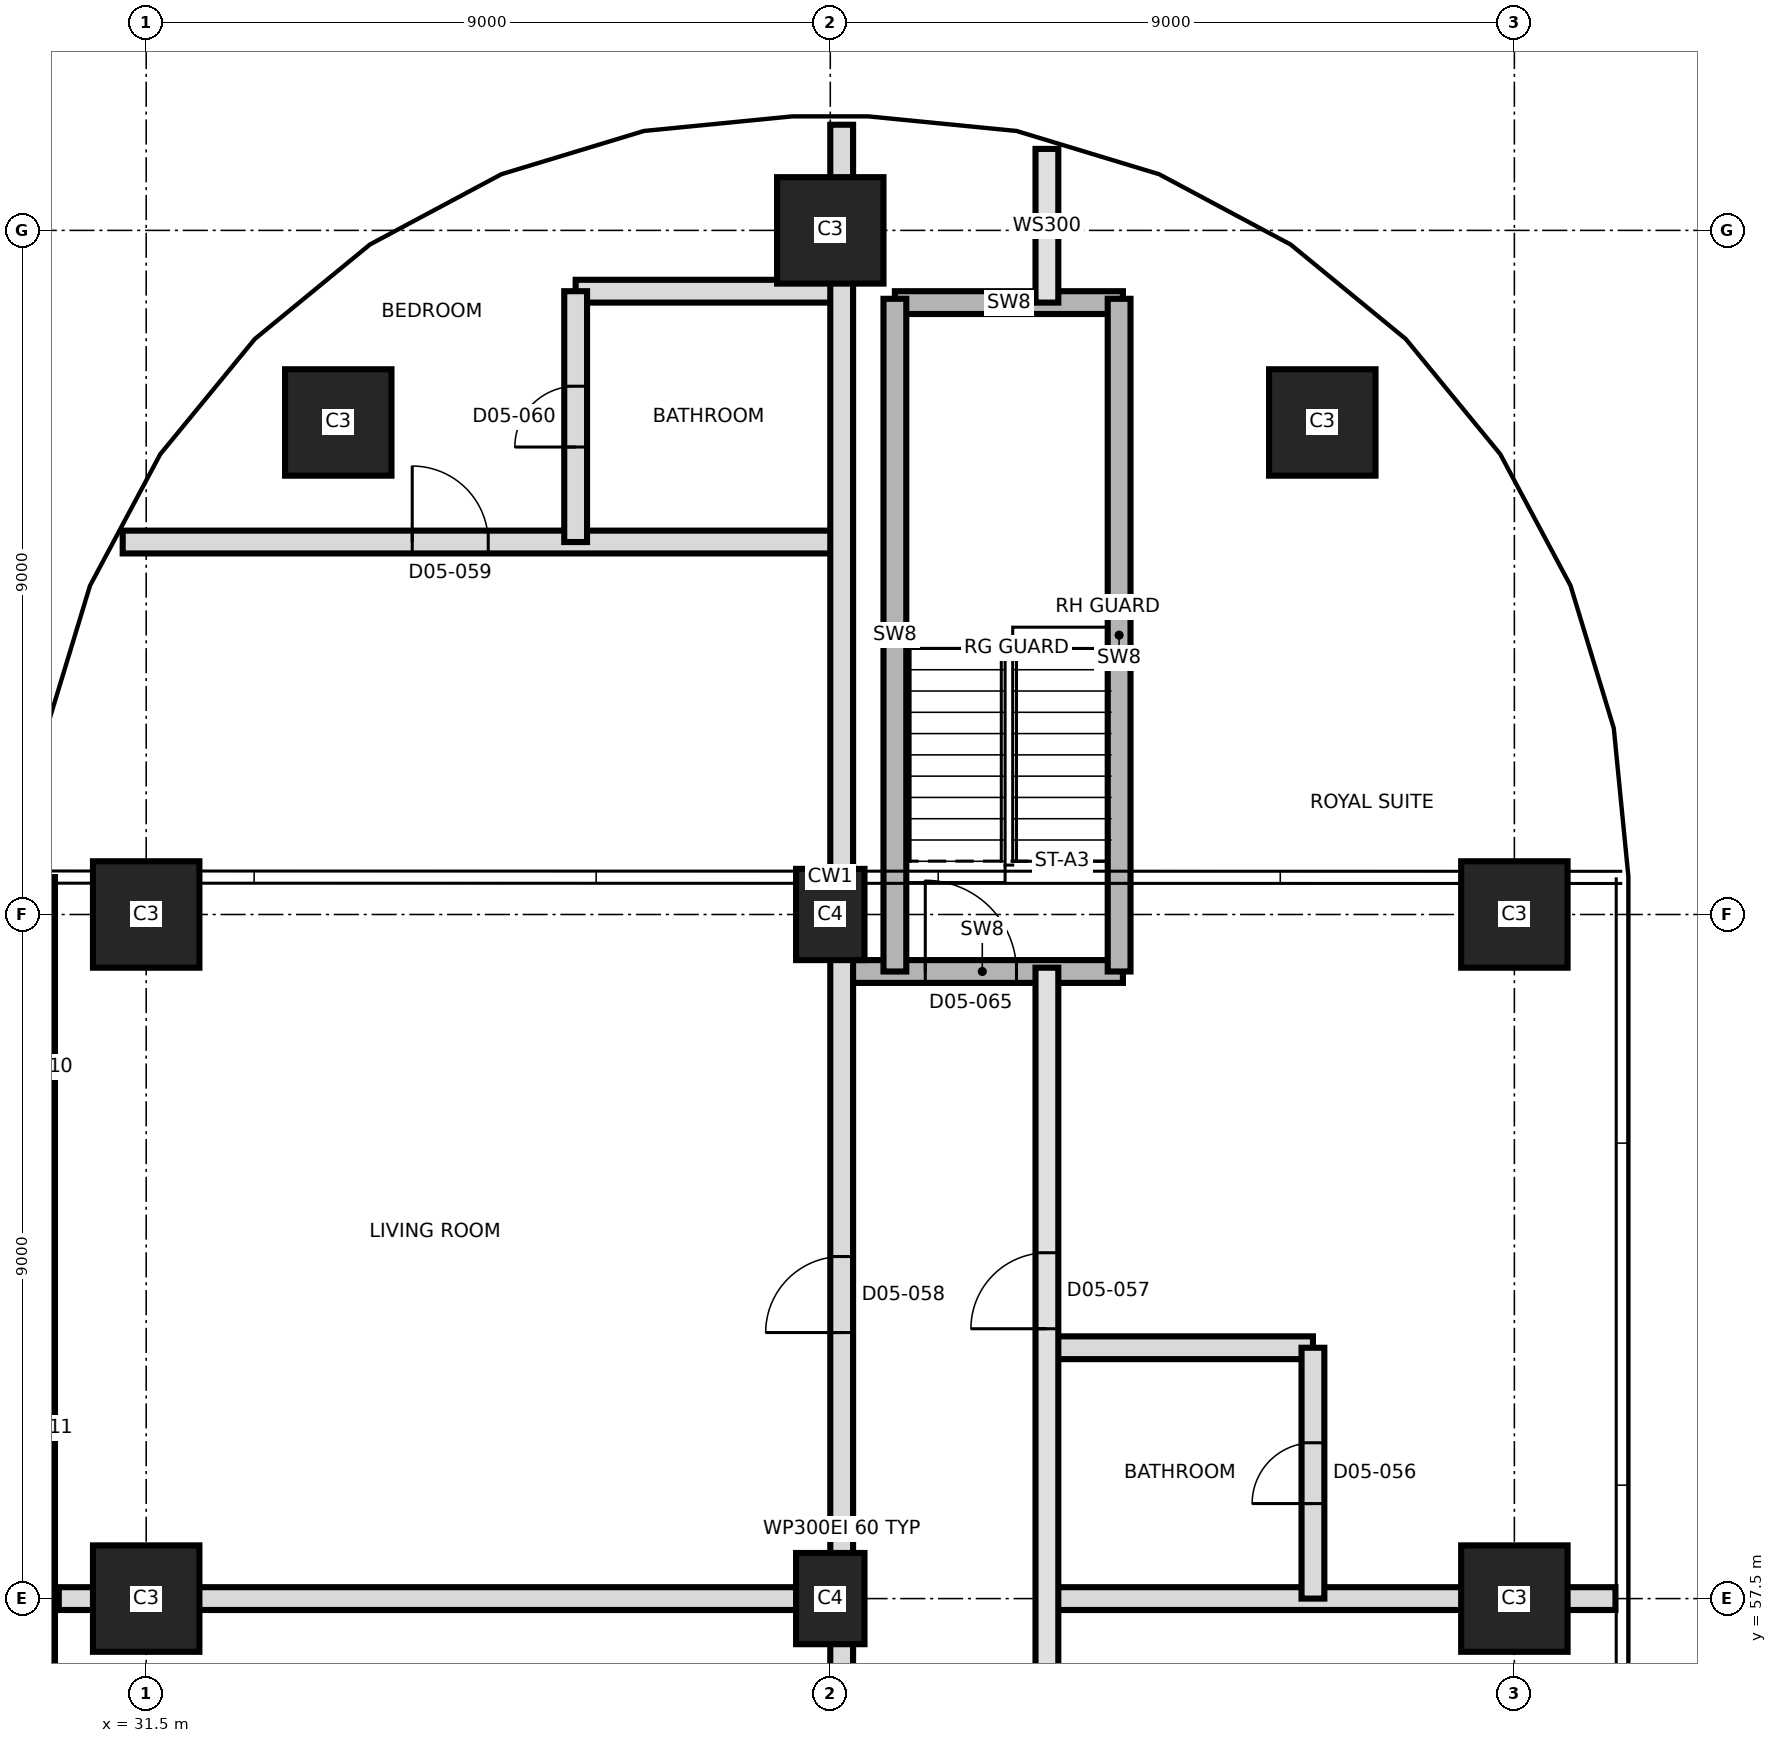
"""IFC4 building model, lengths in metres.
Left out: names, types, materials, properties, quantities, classifications, styles, units other than length and angle.
Written with IfcOpenShell. Run it as: python <this file> out.ifc"""

import sys

from ifc_helpers import new_model, si_unit, direction, frame, frame_2d, origin, origin_2d, place, context, subcontext, project, spatial, rectangle, extrude, element, fill, save


model = new_model("IFC4")
c1 = context("Model", 3, precision=1e-05, world=origin(), true_north=direction((0.0, 1.0)))
c2 = subcontext(c1, "Body", "Model", "MODEL_VIEW")
j1 = project(units=[si_unit("LENGTHUNIT", "METRE"), si_unit("PLANEANGLEUNIT", "RADIAN")], contexts=[c1])
p1 = place(None, origin())
s1 = spatial("IfcSite", under=j1, at=p1, CompositionType="ELEMENT")
p2 = place(p1, origin())
s2 = spatial("IfcBuilding", under=s1, at=p2, CompositionType="ELEMENT")
p3 = place(p2, frame((0.0, 0.0, 70.5)))
s3 = spatial("IfcBuildingStorey", under=s2, at=p3, CompositionType="ELEMENT", Elevation=70.5)
p4 = place(p3, frame((31.5, 57.5, 0.0), z_axis=(0.0, 0.0, 1.0), x_axis=(1.0, 0.0, 0.0)))
e1 = element("IfcColumn", 1, at=p4, inside=s3, PredefinedType="COLUMN", context=c2, shape_type="SweptSolid", body=[
    extrude(rectangle(XDim=1.4, YDim=1.4, at=origin_2d()), origin(), (0.0, 0.0, 1.0), 3.7),
])
p5 = place(p3, frame((40.5, 57.5, 0.0), z_axis=(0.0, 0.0, 1.0), x_axis=(0.0, 1.0, 0.0)))
e2 = element("IfcColumn", 2, at=p5, inside=s3, PredefinedType="COLUMN", context=c2, shape_type="SweptSolid", body=[
    extrude(rectangle(XDim=1.2, YDim=0.9, at=origin_2d()), origin(), (0.0, 0.0, 1.0), 3.7),
])
for number, where, z_axis, x_axis in (
    (3, (49.5, 57.5, 0.0), (0.0, 0.0, 1.0), (1.0, 0.0, 0.0)),
    (4, (31.5, 66.5, 0.0), (0.0, 0.0, 1.0), (1.0, 0.0, 0.0)),
):
    element("IfcColumn", number, at=place(p3, frame(where, z_axis=z_axis, x_axis=x_axis)), inside=s3, PredefinedType="COLUMN", context=c2, shape_type="SweptSolid", body=[
        extrude(rectangle(XDim=1.4, YDim=1.4, at=origin_2d()), origin(), (0.0, 0.0, 1.0), 3.7),
    ])
p6 = place(p3, frame((40.5, 66.5, 0.0), z_axis=(0.0, 0.0, 1.0), x_axis=(0.0, 1.0, 0.0)))
e5 = element("IfcColumn", 5, at=p6, inside=s3, PredefinedType="COLUMN", context=c2, shape_type="SweptSolid", body=[
    extrude(rectangle(XDim=1.2, YDim=0.9, at=origin_2d()), origin(), (0.0, 0.0, 1.0), 3.7),
])
for number, where, z_axis, x_axis in (
    (6, (49.5, 66.5, 0.0), (0.0, 0.0, 1.0), (1.0, 0.0, 0.0)),
    (7, (34.027, 72.973, 0.0), (0.0, 0.0, 1.0), (1.0, 0.0, 0.0)),
    (8, (46.973, 72.973, 0.0), (0.0, 0.0, 1.0), (1.0, 0.0, 0.0)),
    (9, (40.5, 75.5, 0.0), (0.0, 0.0, 1.0), (1.0, 0.0, 0.0)),
):
    element("IfcColumn", number, at=place(p3, frame(where, z_axis=z_axis, x_axis=x_axis)), inside=s3, PredefinedType="COLUMN", context=c2, shape_type="SweptSolid", body=[
        extrude(rectangle(XDim=1.4, YDim=1.4, at=origin_2d()), origin(), (0.0, 0.0, 1.0), 3.7),
    ])
p7 = place(p3, frame((30.15, 66.992, 0.0), z_axis=(0.0, 0.0, 1.0), x_axis=(0.0, -1.0, 0.0)))
e10 = element("IfcWall", 10, at=p7, inside=s3, PredefinedType="SOLIDWALL", context=c2, shape_type="SweptSolid", body=[
    extrude(rectangle(XDim=32.968, YDim=0.3, at=frame_2d((16.484, 0.0))), origin(), (0.0, 0.0, 1.0), 3.4),
])
p8 = place(p7, frame((1.596, 0.0, 0.3)))
e11 = element("IfcOpeningElement", 11, at=p8, cuts=e10, PredefinedType="OPENING", context=c2, shape_type="SweptSolid", body=[
    extrude(rectangle(XDim=1.8, YDim=2.4, at=frame_2d((0.9, 1.2))), frame((0.0, 0.16, 0.0), z_axis=(0.0, -1.0, 0.0), x_axis=(1.0, 0.0, 0.0)), (0.0, 0.0, 1.0), 0.32),
])
p9 = place(p7, frame((5.142, 0.0, 0.9)))
e12 = element("IfcOpeningElement", 12, at=p9, cuts=e10, PredefinedType="OPENING", context=c2, shape_type="SweptSolid", body=[
    extrude(rectangle(XDim=4.2, YDim=1.5, at=frame_2d((2.1, 0.75))), frame((0.0, 0.16, 0.0), z_axis=(0.0, -1.0, 0.0), x_axis=(1.0, 0.0, 0.0)), (0.0, 0.0, 1.0), 0.32),
])
p10 = place(p7, frame((9.642, 0.0, 0.9)))
e13 = element("IfcOpeningElement", 13, at=p10, cuts=e10, PredefinedType="OPENING", context=c2, shape_type="SweptSolid", body=[
    extrude(rectangle(XDim=4.2, YDim=1.5, at=frame_2d((2.1, 0.75))), frame((0.0, 0.16, 0.0), z_axis=(0.0, -1.0, 0.0), x_axis=(1.0, 0.0, 0.0)), (0.0, 0.0, 1.0), 0.32),
])
p11 = place(p7, frame((14.142, 0.0, 0.9)))
e14 = element("IfcOpeningElement", 14, at=p11, cuts=e10, PredefinedType="OPENING", context=c2, shape_type="SweptSolid", body=[
    extrude(rectangle(XDim=4.2, YDim=1.5, at=frame_2d((2.1, 0.75))), frame((0.0, 0.16, 0.0), z_axis=(0.0, -1.0, 0.0), x_axis=(1.0, 0.0, 0.0)), (0.0, 0.0, 1.0), 0.32),
])
p12 = place(p7, frame((18.642, 0.0, 0.9)))
e15 = element("IfcOpeningElement", 15, at=p12, cuts=e10, PredefinedType="OPENING", context=c2, shape_type="SweptSolid", body=[
    extrude(rectangle(XDim=4.2, YDim=1.5, at=frame_2d((2.1, 0.75))), frame((0.0, 0.16, 0.0), z_axis=(0.0, -1.0, 0.0), x_axis=(1.0, 0.0, 0.0)), (0.0, 0.0, 1.0), 0.32),
])
p13 = place(p7, frame((23.142, 0.0, 0.9)))
e16 = element("IfcOpeningElement", 16, at=p13, cuts=e10, PredefinedType="OPENING", context=c2, shape_type="SweptSolid", body=[
    extrude(rectangle(XDim=4.2, YDim=1.5, at=frame_2d((2.1, 0.75))), frame((0.0, 0.16, 0.0), z_axis=(0.0, -1.0, 0.0), x_axis=(1.0, 0.0, 0.0)), (0.0, 0.0, 1.0), 0.32),
])
p14 = place(p7, frame((29.33, 0.0, 0.3)))
e17 = element("IfcOpeningElement", 17, at=p14, cuts=e10, PredefinedType="OPENING", context=c2, shape_type="SweptSolid", body=[
    extrude(rectangle(XDim=1.8, YDim=2.4, at=frame_2d((0.9, 1.2))), frame((0.0, 0.16, 0.0), z_axis=(0.0, -1.0, 0.0), x_axis=(1.0, 0.0, 0.0)), (0.0, 0.0, 1.0), 0.32),
])
p15 = place(p3, frame((30.35, 57.5, 0.0), z_axis=(0.0, 0.0, 1.0), x_axis=(1.0, 0.0, 0.0)))
e18 = element("IfcWall", 18, at=p15, inside=s3, PredefinedType="PARTITIONING", context=c2, shape_type="SweptSolid", body=[
    extrude(rectangle(XDim=10.3, YDim=0.3, at=frame_2d((5.15, 0.0))), origin(), (0.0, 0.0, 1.0), 3.4),
])
p16 = place(p3, frame((43.35, 57.5, 0.0), z_axis=(0.0, 0.0, 1.0), x_axis=(1.0, 0.0, 0.0)))
e19 = element("IfcWall", 19, at=p16, inside=s3, PredefinedType="PARTITIONING", context=c2, shape_type="SweptSolid", body=[
    extrude(rectangle(XDim=7.48, YDim=0.3, at=frame_2d((3.74, 0.0))), origin(), (0.0, 0.0, 1.0), 3.4),
])
p17 = place(p3, frame((43.35, 60.8, 0.0), z_axis=(0.0, 0.0, 1.0), x_axis=(1.0, 0.0, 0.0)))
e20 = element("IfcWall", 20, at=p17, inside=s3, PredefinedType="PARTITIONING", context=c2, shape_type="SweptSolid", body=[
    extrude(rectangle(XDim=3.5, YDim=0.3, at=frame_2d((1.75, 0.0))), origin(), (0.0, 0.0, 1.0), 3.4),
])
p18 = place(p3, frame((40.65, 65.75, 0.0), z_axis=(0.0, 0.0, 1.0), x_axis=(1.0, 0.0, 0.0)))
e21 = element("IfcWall", 21, at=p18, inside=s3, PredefinedType="SHEAR", context=c2, shape_type="SweptSolid", body=[
    extrude(rectangle(XDim=3.7, YDim=0.3, at=frame_2d((1.85, 0.0))), origin(), (0.0, 0.0, 1.0), 3.4),
])
p19 = place(p18, frame((1.1, 0.0, 0.0)))
e22 = element("IfcOpeningElement", 22, at=p19, cuts=e21, PredefinedType="OPENING", context=c2, shape_type="SweptSolid", body=[
    extrude(rectangle(XDim=1.2, YDim=2.1, at=frame_2d((0.6, 1.05))), frame((0.0, 0.16, 0.0), z_axis=(0.0, -1.0, 0.0), x_axis=(1.0, 0.0, 0.0)), (0.0, 0.0, 1.0), 0.32),
])
p20 = place(p3, frame((31.191, 71.4, 0.0), z_axis=(0.0, 0.0, 1.0), x_axis=(1.0, 0.0, 0.0)))
e23 = element("IfcWall", 23, at=p20, inside=s3, PredefinedType="PARTITIONING", context=c2, shape_type="SweptSolid", body=[
    extrude(rectangle(XDim=9.459, YDim=0.3, at=frame_2d((4.729, 0.0))), origin(), (0.0, 0.0, 1.0), 3.4),
])
p21 = place(p20, frame((3.809, 0.0, 0.0)))
e24 = element("IfcOpeningElement", 24, at=p21, cuts=e23, PredefinedType="OPENING", context=c2, shape_type="SweptSolid", body=[
    extrude(rectangle(XDim=1.0, YDim=2.1, at=frame_2d((0.5, 1.05))), frame((0.0, 0.16, 0.0), z_axis=(0.0, -1.0, 0.0), x_axis=(1.0, 0.0, 0.0)), (0.0, 0.0, 1.0), 0.32),
])
p22 = place(p3, frame((41.35, 74.55, 0.0), z_axis=(0.0, 0.0, 1.0), x_axis=(1.0, 0.0, 0.0)))
e25 = element("IfcWall", 25, at=p22, inside=s3, PredefinedType="SHEAR", context=c2, shape_type="SweptSolid", body=[
    extrude(rectangle(XDim=3.0, YDim=0.3, at=frame_2d((1.5, 0.0))), origin(), (0.0, 0.0, 1.0), 3.4),
])
p23 = place(p3, frame((37.15, 74.7, 0.0), z_axis=(0.0, 0.0, 1.0), x_axis=(1.0, 0.0, 0.0)))
e26 = element("IfcWall", 26, at=p23, inside=s3, PredefinedType="PARTITIONING", context=c2, shape_type="SweptSolid", body=[
    extrude(rectangle(XDim=3.5, YDim=0.3, at=frame_2d((1.75, 0.0))), origin(), (0.0, 0.0, 1.0), 3.4),
])
p24 = place(p3, frame((37.15, 71.4, 0.0), z_axis=(0.0, 0.0, 1.0), x_axis=(0.0, 1.0, 0.0)))
e27 = element("IfcWall", 27, at=p24, inside=s3, PredefinedType="PARTITIONING", context=c2, shape_type="SweptSolid", body=[
    extrude(rectangle(XDim=3.3, YDim=0.3, at=frame_2d((1.65, 0.0))), origin(), (0.0, 0.0, 1.0), 3.4),
])
p25 = place(p24, frame((1.25, 0.0, 0.0)))
e28 = element("IfcOpeningElement", 28, at=p25, cuts=e27, PredefinedType="OPENING", context=c2, shape_type="SweptSolid", body=[
    extrude(rectangle(XDim=0.8, YDim=2.1, at=frame_2d((0.4, 1.05))), frame((0.0, 0.16, 0.0), z_axis=(0.0, -1.0, 0.0), x_axis=(1.0, 0.0, 0.0)), (0.0, 0.0, 1.0), 0.32),
])
p26 = place(p3, frame((40.65, 39.95, 0.0), z_axis=(0.0, 0.0, 1.0), x_axis=(0.0, 1.0, 0.0)))
e29 = element("IfcWall", 29, at=p26, inside=s3, PredefinedType="PARTITIONING", context=c2, shape_type="SweptSolid", body=[
    extrude(rectangle(XDim=36.94, YDim=0.3, at=frame_2d((18.47, 0.0))), origin(), (0.0, 0.0, 1.0), 3.4),
])
p27 = place(p26, frame((0.7, 0.0, 0.0)))
e30 = element("IfcOpeningElement", 30, at=p27, cuts=e29, PredefinedType="OPENING", context=c2, shape_type="SweptSolid", body=[
    extrude(rectangle(XDim=1.0, YDim=2.1, at=frame_2d((0.5, 1.05))), frame((0.0, 0.16, 0.0), z_axis=(0.0, -1.0, 0.0), x_axis=(1.0, 0.0, 0.0)), (0.0, 0.0, 1.0), 0.32),
])
p28 = place(p26, frame((6.55, 0.0, 0.0)))
e31 = element("IfcOpeningElement", 31, at=p28, cuts=e29, PredefinedType="OPENING", context=c2, shape_type="SweptSolid", body=[
    extrude(rectangle(XDim=1.0, YDim=2.1, at=frame_2d((0.5, 1.05))), frame((0.0, 0.16, 0.0), z_axis=(0.0, -1.0, 0.0), x_axis=(1.0, 0.0, 0.0)), (0.0, 0.0, 1.0), 0.32),
])
p29 = place(p26, frame((9.22, 0.0, 0.0)))
e32 = element("IfcOpeningElement", 32, at=p29, cuts=e29, PredefinedType="OPENING", context=c2, shape_type="SweptSolid", body=[
    extrude(rectangle(XDim=1.0, YDim=2.1, at=frame_2d((0.5, 1.05))), frame((0.0, 0.16, 0.0), z_axis=(0.0, -1.0, 0.0), x_axis=(1.0, 0.0, 0.0)), (0.0, 0.0, 1.0), 0.32),
])
p30 = place(p26, frame((15.07, 0.0, 0.0)))
e33 = element("IfcOpeningElement", 33, at=p30, cuts=e29, PredefinedType="OPENING", context=c2, shape_type="SweptSolid", body=[
    extrude(rectangle(XDim=1.0, YDim=2.1, at=frame_2d((0.5, 1.05))), frame((0.0, 0.16, 0.0), z_axis=(0.0, -1.0, 0.0), x_axis=(1.0, 0.0, 0.0)), (0.0, 0.0, 1.0), 0.32),
])
p31 = place(p26, frame((21.05, 0.0, 0.0)))
e34 = element("IfcOpeningElement", 34, at=p31, cuts=e29, PredefinedType="OPENING", context=c2, shape_type="SweptSolid", body=[
    extrude(rectangle(XDim=1.0, YDim=2.4, at=frame_2d((0.5, 1.2))), frame((0.0, 0.16, 0.0), z_axis=(0.0, -1.0, 0.0), x_axis=(1.0, 0.0, 0.0)), (0.0, 0.0, 1.0), 0.32),
])
p32 = place(p3, frame((41.35, 65.75, 0.0), z_axis=(0.0, 0.0, 1.0), x_axis=(0.0, 1.0, 0.0)))
e35 = element("IfcWall", 35, at=p32, inside=s3, PredefinedType="SHEAR", context=c2, shape_type="SweptSolid", body=[
    extrude(rectangle(XDim=8.85, YDim=0.3, at=frame_2d((4.425, 0.0))), origin(), (0.0, 0.0, 1.0), 3.4),
])
p33 = place(p3, frame((43.35, 39.95, 0.0), z_axis=(0.0, 0.0, 1.0), x_axis=(0.0, 1.0, 0.0)))
e36 = element("IfcWall", 36, at=p33, inside=s3, PredefinedType="SOLIDWALL", context=c2, shape_type="SweptSolid", body=[
    extrude(rectangle(XDim=25.85, YDim=0.3, at=frame_2d((12.925, 0.0))), origin(), (0.0, 0.0, 1.0), 3.4),
])
p34 = place(p33, frame((3.55, 0.0, 0.0)))
e37 = element("IfcOpeningElement", 37, at=p34, cuts=e36, PredefinedType="OPENING", context=c2, shape_type="SweptSolid", body=[
    extrude(rectangle(XDim=1.0, YDim=2.4, at=frame_2d((0.5, 1.2))), frame((0.0, 0.16, 0.0), z_axis=(0.0, -1.0, 0.0), x_axis=(1.0, 0.0, 0.0)), (0.0, 0.0, 1.0), 0.32),
])
p35 = place(p33, frame((9.7, 0.0, 0.0)))
e38 = element("IfcOpeningElement", 38, at=p35, cuts=e36, PredefinedType="OPENING", context=c2, shape_type="SweptSolid", body=[
    extrude(rectangle(XDim=1.0, YDim=2.1, at=frame_2d((0.5, 1.05))), frame((0.0, 0.16, 0.0), z_axis=(0.0, -1.0, 0.0), x_axis=(1.0, 0.0, 0.0)), (0.0, 0.0, 1.0), 0.32),
])
p36 = place(p33, frame((15.55, 0.0, 0.0)))
e39 = element("IfcOpeningElement", 39, at=p36, cuts=e36, PredefinedType="OPENING", context=c2, shape_type="SweptSolid", body=[
    extrude(rectangle(XDim=1.0, YDim=2.1, at=frame_2d((0.5, 1.05))), frame((0.0, 0.16, 0.0), z_axis=(0.0, -1.0, 0.0), x_axis=(1.0, 0.0, 0.0)), (0.0, 0.0, 1.0), 0.32),
])
p37 = place(p33, frame((21.1, 0.0, 0.0)))
e40 = element("IfcOpeningElement", 40, at=p37, cuts=e36, PredefinedType="OPENING", context=c2, shape_type="SweptSolid", body=[
    extrude(rectangle(XDim=1.0, YDim=2.4, at=frame_2d((0.5, 1.2))), frame((0.0, 0.16, 0.0), z_axis=(0.0, -1.0, 0.0), x_axis=(1.0, 0.0, 0.0)), (0.0, 0.0, 1.0), 0.32),
])
p38 = place(p3, frame((43.35, 74.55, 0.0), z_axis=(0.0, 0.0, 1.0), x_axis=(0.0, 1.0, 0.0)))
e41 = element("IfcWall", 41, at=p38, inside=s3, PredefinedType="SOLIDWALL", context=c2, shape_type="SweptSolid", body=[
    extrude(rectangle(XDim=2.022, YDim=0.3, at=frame_2d((1.011, 0.0))), origin(), (0.0, 0.0, 1.0), 3.4),
])
p39 = place(p3, frame((44.3, 65.75, 0.0), z_axis=(0.0, 0.0, 1.0), x_axis=(0.0, 1.0, 0.0)))
e42 = element("IfcWall", 42, at=p39, inside=s3, PredefinedType="SHEAR", context=c2, shape_type="SweptSolid", body=[
    extrude(rectangle(XDim=8.85, YDim=0.3, at=frame_2d((4.425, 0.0))), origin(), (0.0, 0.0, 1.0), 3.4),
])
p40 = place(p3, frame((46.85, 57.5, 0.0), z_axis=(0.0, 0.0, 1.0), x_axis=(0.0, 1.0, 0.0)))
e43 = element("IfcWall", 43, at=p40, inside=s3, PredefinedType="PARTITIONING", context=c2, shape_type="SweptSolid", body=[
    extrude(rectangle(XDim=3.3, YDim=0.3, at=frame_2d((1.65, 0.0))), origin(), (0.0, 0.0, 1.0), 3.4),
])
p41 = place(p40, frame((1.25, 0.0, 0.0)))
e44 = element("IfcOpeningElement", 44, at=p41, cuts=e43, PredefinedType="OPENING", context=c2, shape_type="SweptSolid", body=[
    extrude(rectangle(XDim=0.8, YDim=2.1, at=frame_2d((0.4, 1.05))), frame((0.0, 0.16, 0.0), z_axis=(0.0, -1.0, 0.0), x_axis=(1.0, 0.0, 0.0)), (0.0, 0.0, 1.0), 0.32),
])
p42 = place(p41, origin())
e45 = element("IfcDoor", 45, at=p42, inside=s3, OperationType="SINGLE_SWING_LEFT", PredefinedType="DOOR", context=c2, shape_type="SweptSolid", body=[
    extrude(rectangle(XDim=0.8, YDim=2.1, at=frame_2d((0.4, 1.05))), frame((0.0, 0.025, 0.0), z_axis=(0.0, -1.0, 0.0), x_axis=(1.0, 0.0, 0.0)), (0.0, 0.0, 1.0), 0.05),
])
fill(e44, e45)
p43 = place(p37, origin())
e46 = element("IfcDoor", 46, at=p43, inside=s3, OperationType="SINGLE_SWING_LEFT", PredefinedType="DOOR", context=c2, shape_type="SweptSolid", body=[
    extrude(rectangle(XDim=1.0, YDim=2.4, at=frame_2d((0.5, 1.2))), frame((0.0, 0.025, 0.0), z_axis=(0.0, -1.0, 0.0), x_axis=(1.0, 0.0, 0.0)), (0.0, 0.0, 1.0), 0.05),
])
fill(e40, e46)
p44 = place(p31, origin())
e47 = element("IfcDoor", 47, at=p44, inside=s3, OperationType="SINGLE_SWING_RIGHT", PredefinedType="DOOR", context=c2, shape_type="SweptSolid", body=[
    extrude(rectangle(XDim=1.0, YDim=2.4, at=frame_2d((0.5, 1.2))), frame((0.0, 0.025, 0.0), z_axis=(0.0, -1.0, 0.0), x_axis=(1.0, 0.0, 0.0)), (0.0, 0.0, 1.0), 0.05),
])
fill(e34, e47)
p45 = place(p21, origin())
e48 = element("IfcDoor", 48, at=p45, inside=s3, OperationType="SINGLE_SWING_LEFT", PredefinedType="DOOR", context=c2, shape_type="SweptSolid", body=[
    extrude(rectangle(XDim=1.0, YDim=2.1, at=frame_2d((0.5, 1.05))), frame((0.0, 0.025, 0.0), z_axis=(0.0, -1.0, 0.0), x_axis=(1.0, 0.0, 0.0)), (0.0, 0.0, 1.0), 0.05),
])
fill(e24, e48)
p46 = place(p25, origin())
e49 = element("IfcDoor", 49, at=p46, inside=s3, OperationType="SINGLE_SWING_LEFT", PredefinedType="DOOR", context=c2, shape_type="SweptSolid", body=[
    extrude(rectangle(XDim=0.8, YDim=2.1, at=frame_2d((0.4, 1.05))), frame((0.0, 0.025, 0.0), z_axis=(0.0, -1.0, 0.0), x_axis=(1.0, 0.0, 0.0)), (0.0, 0.0, 1.0), 0.05),
])
fill(e28, e49)
p47 = place(p19, origin())
e50 = element("IfcDoor", 50, at=p47, inside=s3, OperationType="SINGLE_SWING_RIGHT", PredefinedType="DOOR", context=c2, shape_type="SweptSolid", body=[
    extrude(rectangle(XDim=1.2, YDim=2.1, at=frame_2d((0.6, 1.05))), frame((0.0, 0.025, 0.0), z_axis=(0.0, -1.0, 0.0), x_axis=(1.0, 0.0, 0.0)), (0.0, 0.0, 1.0), 0.05),
])
fill(e22, e50)
save(model, sys.argv[1])
